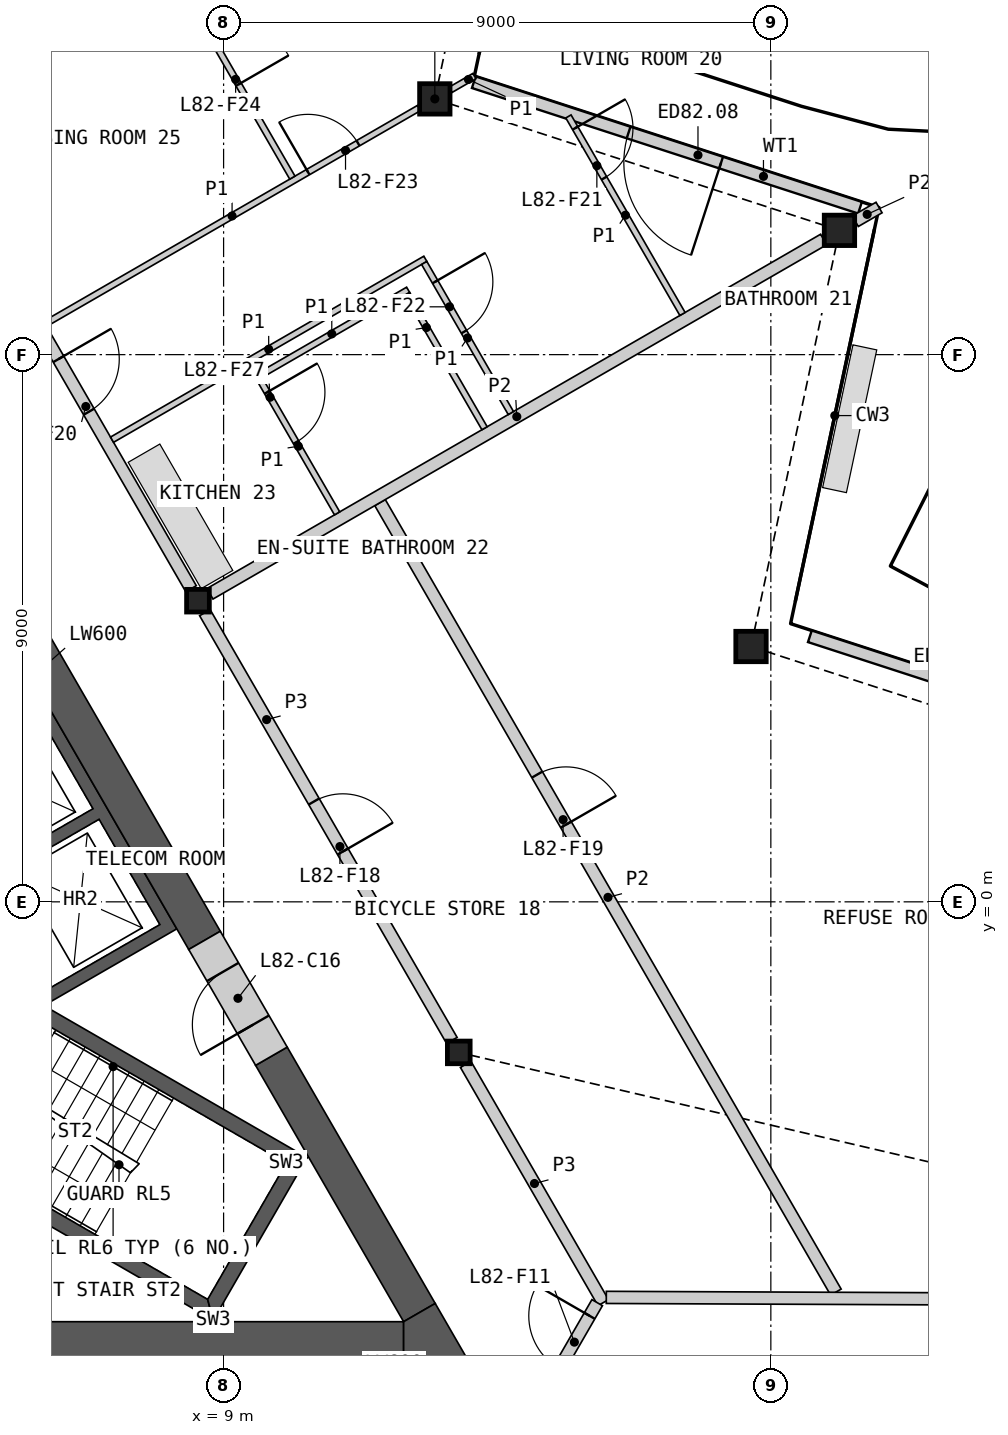
"""IFC4 building model, lengths in metres.
Left out: names, types, materials, properties, quantities, classifications, styles, units other than length and angle.
Written with IfcOpenShell. Run it as: python <this file> out.ifc"""

import sys

from ifc_helpers import new_model, si_unit, direction, frame, frame_2d, origin, origin_2d, place, context, subcontext, project, spatial, polyline, rectangle, hollow_rectangle, i_section, outline, extrude, element, fill, save


model = new_model("IFC4")
c1 = context("Model", 3, precision=1e-05, world=origin(), true_north=direction((0.0, 1.0)))
c2 = subcontext(c1, "Body", "Model", "MODEL_VIEW")
j1 = project(units=[si_unit("LENGTHUNIT", "METRE"), si_unit("PLANEANGLEUNIT", "RADIAN")], contexts=[c1])
p1 = place(None, origin())
s1 = spatial("IfcSite", under=j1, at=p1, CompositionType="ELEMENT")
p2 = place(p1, origin())
s2 = spatial("IfcBuilding", under=s1, at=p2, CompositionType="ELEMENT")
p3 = place(p2, frame((0.0, 0.0, 367.8)))
s3 = spatial("IfcBuildingStorey", under=s2, at=p3, CompositionType="ELEMENT", Elevation=367.8)
for number, where, z_axis, x_axis in (
    (1, (17.674, 4.199, 0.0), (0.0, 0.0, 1.0), (1.0, 0.0, 0.0)),
    (2, (19.129, 11.044, 0.0), (0.0, 0.0, 1.0), (1.0, 0.0, 0.0)),
    (3, (12.474, 13.206, 0.0), (0.0, 0.0, 1.0), (1.0, 0.0, 0.0)),
):
    element("IfcColumn", number, at=place(p3, frame(where, z_axis=z_axis, x_axis=x_axis)), inside=s3, PredefinedType="COLUMN", context=c2, shape_type="SweptSolid", body=[
        extrude(hollow_rectangle(XDim=0.5, YDim=0.5, WallThickness=0.03, at=origin_2d()), origin(), (0.0, 0.0, 1.0), 3.4),
    ])
for number, where, z_axis, x_axis in (
    (4, (12.868, -2.476, 0.0), (0.0, 0.0, 1.0), (1.0, 0.0, 0.0)),
    (5, (8.578, 4.953, 0.0), (0.0, 0.0, 1.0), (1.0, 0.0, 0.0)),
):
    element("IfcColumn", number, at=place(p3, frame(where, z_axis=z_axis, x_axis=x_axis)), inside=s3, PredefinedType="COLUMN", context=c2, shape_type="SweptSolid", body=[
        extrude(i_section(OverallWidth=0.374, OverallDepth=0.372, WebThickness=0.016, FlangeThickness=0.026, at=origin_2d()), origin(), (0.0, 0.0, 1.0), 3.4),
    ])
p4 = place(p3, frame((24.601, 2.431, 0.0), z_axis=(0.0, 0.0, 1.0), x_axis=(-0.951060123915, 0.309005891041, 0.0)))
e6 = element("IfcWall", 6, at=p4, inside=s3, PredefinedType="SOLIDWALL", context=c2, shape_type="SweptSolid", body=[
    extrude(rectangle(XDim=6.265, YDim=0.2, at=frame_2d((3.133, 0.0))), origin(), (0.0, 0.0, 1.0), 2.634),
])
p5 = place(p4, frame((2.333, 0.0, 0.0)))
e7 = element("IfcOpeningElement", 7, at=p5, cuts=e6, PredefinedType="OPENING", context=c2, shape_type="SweptSolid", body=[
    extrude(rectangle(XDim=1.6, YDim=2.25, at=frame_2d((0.8, 1.125))), frame((0.0, 0.11, 0.0), z_axis=(0.0, -1.0, 0.0), x_axis=(1.0, 0.0, 0.0)), (0.0, 0.0, 1.0), 0.22),
])
p6 = place(p3, frame((19.467, 11.416, 0.0), z_axis=(0.0, 0.0, 1.0), x_axis=(-0.951057706878, 0.309013330114, 0.0)))
e8 = element("IfcWall", 8, at=p6, inside=s3, PredefinedType="SOLIDWALL", context=c2, shape_type="SweptSolid", body=[
    extrude(rectangle(XDim=6.678, YDim=0.2, at=frame_2d((3.339, 0.0))), origin(), (0.0, 0.0, 1.0), 2.634),
])
p7 = place(p6, frame((2.402, 0.0, 0.0)))
e9 = element("IfcOpeningElement", 9, at=p7, cuts=e8, PredefinedType="OPENING", context=c2, shape_type="SweptSolid", body=[
    extrude(rectangle(XDim=1.6, YDim=2.25, at=frame_2d((0.8, 1.125))), frame((0.0, 0.11, 0.0), z_axis=(0.0, -1.0, 0.0), x_axis=(1.0, 0.0, 0.0)), (0.0, 0.0, 1.0), 0.22),
])
p8 = place(p3, origin())
e10 = element("IfcWall", 10, at=p8, inside=s3, PredefinedType="SHEAR", context=c2, shape_type="SweptSolid", body=[
    extrude(outline(polyline([(1.561, 6.097), (3.731, 7.35), (8.231, -0.444), (6.061, -1.697), (5.96, -1.524), (7.952, -0.374), (6.952, 1.358), (4.96, 0.208), (4.861, 0.381), (6.852, 1.531), (5.852, 3.263), (3.861, 2.113), (3.76, 2.287), (5.752, 3.437), (4.752, 5.169), (2.76, 4.019), (2.66, 4.192), (4.652, 5.342), (3.652, 7.074), (1.66, 5.924), (1.561, 6.097)])), origin(), (0.0, 0.0, 1.0), 3.1),
])
p9 = place(p3, origin())
e11 = element("IfcWall", 11, at=p9, inside=s3, PredefinedType="SHEAR", context=c2, shape_type="SweptSolid", body=[
    extrude(outline(polyline([(3.763, -3.956), (8.83, -6.881), (8.738, -6.539), (3.888, -3.739), (3.763, -3.956)])), origin(), (0.0, 0.0, 1.0), 3.1),
])
p10 = place(p3, origin())
e12 = element("IfcWall", 12, at=p10, inside=s3, PredefinedType="SHEAR", context=c2, shape_type="SweptSolid", body=[
    extrude(outline(polyline([(8.83, -6.881), (10.374, -4.206), (10.032, -4.298), (8.738, -6.539), (8.83, -6.881)])), origin(), (0.0, 0.0, 1.0), 3.1),
])
p11 = place(p3, origin())
e13 = element("IfcWall", 13, at=p11, inside=s3, PredefinedType="SHEAR", context=c2, shape_type="SweptSolid", body=[
    extrude(outline(polyline([(10.032, -4.298), (10.374, -4.206), (5.307, -1.281), (5.182, -1.498), (10.032, -4.298)])), origin(), (0.0, 0.0, 1.0), 3.1),
])
p12 = place(p3, frame((-11.961, -7.206, 0.0), z_axis=(0.0, 0.0, 1.0), x_axis=(1.0, 0.0, 0.0)))
e14 = element("IfcWall", 14, at=p12, inside=s3, PredefinedType="SHEAR", context=c2, shape_type="SweptSolid", body=[
    extrude(rectangle(XDim=23.921, YDim=0.6, at=frame_2d((11.961, 0.0))), origin(), (0.0, 0.0, 1.0), 3.1),
])
p13 = place(p3, frame((8.686, -0.634, 0.0), z_axis=(0.0, 0.0, 1.0), x_axis=(-0.50001836461, 0.866014800712, 0.0)))
e15 = element("IfcWall", 15, at=p13, inside=s3, PredefinedType="SHEAR", context=c2, shape_type="SweptSolid", body=[
    extrude(rectangle(XDim=10.451, YDim=0.6, at=frame_2d((5.225, 0.0))), origin(), (0.0, 0.0, 1.0), 3.1),
])
p14 = place(p3, frame((12.221, -6.756, 0.0), z_axis=(0.0, 0.0, 1.0), x_axis=(-0.50000604952, 0.866021911064, 0.0)))
e16 = element("IfcWall", 16, at=p14, inside=s3, PredefinedType="SHEAR", context=c2, shape_type="SweptSolid", body=[
    extrude(rectangle(XDim=4.869, YDim=0.6, at=frame_2d((2.434, 0.0))), origin(), (0.0, 0.0, 1.0), 3.1),
])
p15 = place(p3, origin())
e17 = element("IfcWall", 17, at=p15, inside=s3, PredefinedType="SHEAR", context=c2, shape_type="SweptSolid", body=[
    extrude(outline(polyline([(11.961, -7.506), (11.961, -6.906), (12.48, -6.606), (13.0, -7.506), (11.961, -7.506)])), origin(), (0.0, 0.0, 1.0), 3.1),
])
p16 = place(p3, frame((9.786, -2.539, 0.0), z_axis=(0.0, 0.0, 1.0), x_axis=(-0.499981787252, 0.866035918664, 0.0)))
e18 = element("IfcWall", 18, at=p16, inside=s3, PredefinedType="SHEAR", context=c2, shape_type="SweptSolid", body=[
    extrude(rectangle(XDim=2.2, YDim=0.6, at=frame_2d((1.1, 0.0))), origin(), (0.0, 0.0, 1.0), 3.1),
])
p17 = place(p16, frame((0.6, 0.0, 0.0)))
e19 = element("IfcOpeningElement", 19, at=p17, cuts=e18, PredefinedType="OPENING", context=c2, shape_type="SweptSolid", body=[
    extrude(rectangle(XDim=1.0, YDim=2.1, at=frame_2d((0.5, 1.05))), frame((0.0, 0.31, 0.0), z_axis=(0.0, -1.0, 0.0), x_axis=(1.0, 0.0, 0.0)), (0.0, 0.0, 1.0), 0.62),
])
p18 = place(p3, frame((4.403, 12.185, 0.0), z_axis=(0.0, 0.0, 1.0), x_axis=(0.499992155518, -0.866029932751, 0.0)))
e20 = element("IfcWall", 20, at=p18, inside=s3, PredefinedType="PARTITIONING", context=c2, shape_type="SweptSolid", body=[
    extrude(rectangle(XDim=8.123, YDim=0.2, at=frame_2d((4.062, 0.0))), origin(), (0.0, 0.0, 1.0), 3.1),
])
p19 = place(p18, frame((3.762, 0.0, 0.0)))
e21 = element("IfcOpeningElement", 21, at=p19, cuts=e20, PredefinedType="OPENING", context=c2, shape_type="SweptSolid", body=[
    extrude(rectangle(XDim=1.0, YDim=2.1, at=frame_2d((0.5, 1.05))), frame((0.0, 0.11, 0.0), z_axis=(0.0, -1.0, 0.0), x_axis=(1.0, 0.0, 0.0)), (0.0, 0.0, 1.0), 0.22),
])
p20 = place(p3, frame((8.692, 4.756, 0.0), z_axis=(0.0, 0.0, 1.0), x_axis=(0.500001682468, -0.866024432409, 0.0)))
e22 = element("IfcWall", 22, at=p20, inside=s3, PredefinedType="PARTITIONING", context=c2, shape_type="SweptSolid", body=[
    extrude(rectangle(XDim=8.124, YDim=0.2, at=frame_2d((4.062, 0.0))), origin(), (0.0, 0.0, 1.0), 3.1),
])
p21 = place(p20, frame((3.587, 0.0, 0.0)))
e23 = element("IfcOpeningElement", 23, at=p21, cuts=e22, PredefinedType="OPENING", context=c2, shape_type="SweptSolid", body=[
    extrude(rectangle(XDim=0.95, YDim=2.1, at=frame_2d((0.475, 1.05))), frame((0.0, 0.11, 0.0), z_axis=(0.0, -1.0, 0.0), x_axis=(1.0, 0.0, 0.0)), (0.0, 0.0, 1.0), 0.22),
])
p22 = place(p3, frame((12.981, -2.673, 0.0), z_axis=(0.0, 0.0, 1.0), x_axis=(0.499974648164, -0.866040040179, 0.0)))
e24 = element("IfcWall", 24, at=p22, inside=s3, PredefinedType="PARTITIONING", context=c2, shape_type="SweptSolid", body=[
    extrude(rectangle(XDim=4.525, YDim=0.2, at=frame_2d((2.263, 0.0))), origin(), (0.0, 0.0, 1.0), 3.1),
])
p23 = place(p3, frame((13.293, -9.797, 0.0), z_axis=(0.0, 0.0, 1.0), x_axis=(0.499977520935, 0.86603838169, 0.0)))
e25 = element("IfcWall", 25, at=p23, inside=s3, PredefinedType="PARTITIONING", context=c2, shape_type="SweptSolid", body=[
    extrude(rectangle(XDim=3.701, YDim=0.2, at=frame_2d((1.851, 0.0))), origin(), (0.0, 0.0, 1.0), 3.1),
])
p24 = place(p23, frame((2.451, 0.0, 0.0)))
e26 = element("IfcOpeningElement", 26, at=p24, cuts=e25, PredefinedType="OPENING", context=c2, shape_type="SweptSolid", body=[
    extrude(rectangle(XDim=1.0, YDim=2.1, at=frame_2d((0.5, 1.05))), frame((0.0, 0.11, 0.0), z_axis=(0.0, -1.0, 0.0), x_axis=(1.0, 0.0, 0.0)), (0.0, 0.0, 1.0), 0.22),
])
p25 = place(p3, frame((11.573, 6.566, 0.0), z_axis=(0.0, 0.0, 1.0), x_axis=(0.499993542657, -0.866029131901, 0.0)))
e27 = element("IfcWall", 27, at=p25, inside=s3, PredefinedType="PARTITIONING", context=c2, shape_type="SweptSolid", body=[
    extrude(rectangle(XDim=14.994, YDim=0.2, at=frame_2d((7.497, 0.0))), origin(), (0.0, 0.0, 1.0), 2.33),
])
p26 = place(p25, frame((5.166, 0.0, 0.0)))
e28 = element("IfcOpeningElement", 28, at=p26, cuts=e27, PredefinedType="OPENING", context=c2, shape_type="SweptSolid", body=[
    extrude(rectangle(XDim=0.95, YDim=2.1, at=frame_2d((0.475, 1.05))), frame((0.0, 0.11, 0.0), z_axis=(0.0, -1.0, 0.0), x_axis=(1.0, 0.0, 0.0)), (0.0, 0.0, 1.0), 0.22),
])
p27 = place(p3, frame((15.294, -6.506, 0.0), z_axis=(0.0, 0.0, 1.0), x_axis=(0.99999116141, -0.004204414611, 0.0)))
e29 = element("IfcWall", 29, at=p27, inside=s3, PredefinedType="PARTITIONING", context=c2, shape_type="SweptSolid", body=[
    extrude(rectangle(XDim=14.807, YDim=0.2, at=frame_2d((7.404, 0.0))), origin(), (0.0, 0.0, 1.0), 2.33),
])
p28 = place(p3, frame((8.775, 5.066, 0.0), z_axis=(0.0, 0.0, 1.0), x_axis=(0.866023724155, 0.500002909193, 0.0)))
e30 = element("IfcWall", 30, at=p28, inside=s3, PredefinedType="PARTITIONING", context=c2, shape_type="SweptSolid", body=[
    extrude(rectangle(XDim=11.655, YDim=0.2, at=frame_2d((5.827, 0.0))), origin(), (0.0, 0.0, 1.0), 2.33),
])
p29 = place(p3, frame((19.389, 11.194, 0.0), z_axis=(0.0, 0.0, 1.0), x_axis=(0.866104518135, 0.499862944882, 0.0)))
e31 = element("IfcWall", 31, at=p29, inside=s3, PredefinedType="PARTITIONING", context=c2, shape_type="SweptSolid", body=[
    extrude(rectangle(XDim=0.451, YDim=0.2, at=frame_2d((0.226, 0.0))), origin(), (0.0, 0.0, 1.0), 2.33),
])
p30 = place(p3, frame((3.465, 14.01, 0.0), z_axis=(0.0, 0.0, 1.0), x_axis=(0.866032376801, 0.499987922186, 0.0)))
e32 = element("IfcWall", 32, at=p30, inside=s3, PredefinedType="PARTITIONING", context=c2, shape_type="SweptSolid", body=[
    extrude(rectangle(XDim=11.782, YDim=0.1, at=frame_2d((5.891, 0.0))), origin(), (0.0, 0.0, 1.0), 2.33),
])
p31 = place(p30, frame((6.67, 0.0, 0.0)))
e33 = element("IfcOpeningElement", 33, at=p31, cuts=e32, PredefinedType="OPENING", context=c2, shape_type="SweptSolid", body=[
    extrude(rectangle(XDim=0.95, YDim=2.1, at=frame_2d((0.475, 1.05))), frame((0.0, 0.06, 0.0), z_axis=(0.0, -1.0, 0.0), x_axis=(1.0, 0.0, 0.0)), (0.0, 0.0, 1.0), 0.12),
])
p32 = place(p3, frame((6.065, 9.506, 0.0), z_axis=(0.0, 0.0, 1.0), x_axis=(0.866018949465, 0.500011179042, 0.0)))
e34 = element("IfcWall", 34, at=p32, inside=s3, PredefinedType="PARTITIONING", context=c2, shape_type="SweptSolid", body=[
    extrude(rectangle(XDim=7.1, YDim=0.1, at=frame_2d((3.55, 0.0))), origin(), (0.0, 0.0, 1.0), 2.33),
])
p33 = place(p32, frame((4.992, 0.0, 0.0)))
e35 = element("IfcOpeningElement", 35, at=p33, cuts=e34, PredefinedType="OPENING", context=c2, shape_type="SweptSolid", body=[
    extrude(rectangle(XDim=0.95, YDim=2.1, at=frame_2d((0.475, 1.05))), frame((0.0, 0.06, 0.0), z_axis=(0.0, -1.0, 0.0), x_axis=(1.0, 0.0, 0.0)), (0.0, 0.0, 1.0), 0.12),
])
p34 = place(p3, frame((7.165, 7.601, 0.0), z_axis=(0.0, 0.0, 1.0), x_axis=(0.866017493347, 0.500013701029, 0.0)))
e36 = element("IfcWall", 36, at=p34, inside=s3, PredefinedType="PARTITIONING", context=c2, shape_type="SweptSolid", body=[
    extrude(rectangle(XDim=5.95, YDim=0.1, at=frame_2d((2.975, 0.0))), origin(), (0.0, 0.0, 1.0), 2.33),
])
p35 = place(p3, frame((7.581, 16.328, 0.0), z_axis=(0.0, 0.0, 1.0), x_axis=(0.500005610874, -0.86602216432, 0.0)))
e37 = element("IfcWall", 37, at=p35, inside=s3, PredefinedType="PARTITIONING", context=c2, shape_type="SweptSolid", body=[
    extrude(rectangle(XDim=5.1, YDim=0.1, at=frame_2d((2.55, 0.0))), origin(), (0.0, 0.0, 1.0), 2.33),
])
p36 = place(p35, frame((2.379, 0.0, 0.0)))
e38 = element("IfcOpeningElement", 38, at=p36, cuts=e37, PredefinedType="OPENING", context=c2, shape_type="SweptSolid", body=[
    extrude(rectangle(XDim=0.95, YDim=2.1, at=frame_2d((0.475, 1.05))), frame((0.0, 0.06, 0.0), z_axis=(0.0, -1.0, 0.0), x_axis=(1.0, 0.0, 0.0)), (0.0, 0.0, 1.0), 0.12),
])
p37 = place(p3, frame((14.671, 12.918, 0.0), z_axis=(0.0, 0.0, 1.0), x_axis=(0.499981580887, -0.866036037803, 0.0)))
e39 = element("IfcWall", 39, at=p37, inside=s3, PredefinedType="PARTITIONING", context=c2, shape_type="SweptSolid", body=[
    extrude(rectangle(XDim=3.752, YDim=0.1, at=frame_2d((1.876, 0.0))), origin(), (0.0, 0.0, 1.0), 2.33),
])
p38 = place(p37, frame((0.222, 0.0, 0.0)))
e40 = element("IfcOpeningElement", 40, at=p38, cuts=e39, PredefinedType="OPENING", context=c2, shape_type="SweptSolid", body=[
    extrude(rectangle(XDim=0.95, YDim=2.1, at=frame_2d((0.475, 1.05))), frame((0.0, 0.06, 0.0), z_axis=(0.0, -1.0, 0.0), x_axis=(1.0, 0.0, 0.0)), (0.0, 0.0, 1.0), 0.12),
])
p39 = place(p3, frame((12.3, 10.508, 0.0), z_axis=(0.0, 0.0, 1.0), x_axis=(0.499999279071, -0.866025820012, 0.0)))
e41 = element("IfcWall", 41, at=p39, inside=s3, PredefinedType="PARTITIONING", context=c2, shape_type="SweptSolid", body=[
    extrude(rectangle(XDim=2.85, YDim=0.1, at=frame_2d((1.425, 0.0))), origin(), (0.0, 0.0, 1.0), 2.33),
])
p40 = place(p39, frame((0.358, 0.0, 0.0)))
e42 = element("IfcOpeningElement", 42, at=p40, cuts=e41, PredefinedType="OPENING", context=c2, shape_type="SweptSolid", body=[
    extrude(rectangle(XDim=0.95, YDim=2.1, at=frame_2d((0.475, 1.05))), frame((0.0, 0.06, 0.0), z_axis=(0.0, -1.0, 0.0), x_axis=(1.0, 0.0, 0.0)), (0.0, 0.0, 1.0), 0.12),
])
p41 = place(p3, frame((9.523, 8.616, 0.0), z_axis=(0.0, 0.0, 1.0), x_axis=(0.866032775405, 0.499987231761, 0.0)))
e43 = element("IfcWall", 43, at=p41, inside=s3, PredefinedType="PARTITIONING", context=c2, shape_type="SweptSolid", body=[
    extrude(rectangle(XDim=2.9, YDim=0.1, at=frame_2d((1.45, 0.0))), origin(), (0.0, 0.0, 1.0), 2.33),
])
p42 = place(p3, frame((12.017, 9.998, 0.0), z_axis=(0.0, 0.0, 1.0), x_axis=(0.499948979701, -0.866054858364, 0.0)))
e44 = element("IfcWall", 44, at=p42, inside=s3, PredefinedType="PARTITIONING", context=c2, shape_type="SweptSolid", body=[
    extrude(rectangle(XDim=2.55, YDim=0.1, at=frame_2d((1.275, 0.0))), origin(), (0.0, 0.0, 1.0), 2.33),
])
p43 = place(p3, frame((9.592, 8.598, 0.0), z_axis=(0.0, 0.0, 1.0), x_axis=(0.499990435942, -0.866030925526, 0.0)))
e45 = element("IfcWall", 45, at=p43, inside=s3, PredefinedType="PARTITIONING", context=c2, shape_type="SweptSolid", body=[
    extrude(rectangle(XDim=2.55, YDim=0.1, at=frame_2d((1.275, 0.0))), origin(), (0.0, 0.0, 1.0), 2.33),
])
p44 = place(p43, frame((0.25, 0.0, 0.0)))
e46 = element("IfcOpeningElement", 46, at=p44, cuts=e45, PredefinedType="OPENING", context=c2, shape_type="SweptSolid", body=[
    extrude(rectangle(XDim=0.95, YDim=2.1, at=frame_2d((0.475, 1.05))), frame((0.0, 0.06, 0.0), z_axis=(0.0, -1.0, 0.0), x_axis=(1.0, 0.0, 0.0)), (0.0, 0.0, 1.0), 0.12),
])
p45 = place(p3, frame((12.734, 13.356, 0.0), z_axis=(0.0, 0.0, 1.0), x_axis=(0.865870279271, 0.500268587336, 0.0)))
e47 = element("IfcWall", 47, at=p45, inside=s3, PredefinedType="PARTITIONING", context=c2, shape_type="SweptSolid", body=[
    extrude(rectangle(XDim=0.451, YDim=0.1, at=frame_2d((0.226, 0.0))), origin(), (0.0, 0.0, 1.0), 2.33),
])
p46 = place(p7, origin())
e48 = element("IfcDoor", 48, at=p46, inside=s3, OperationType="DOUBLE_DOOR_SINGLE_SWING", PredefinedType="DOOR", context=c2, shape_type="SweptSolid", body=[
    extrude(rectangle(XDim=1.6, YDim=2.25, at=frame_2d((0.8, 1.125))), frame((0.0, 0.025, 0.0), z_axis=(0.0, -1.0, 0.0), x_axis=(1.0, 0.0, 0.0)), (0.0, 0.0, 1.0), 0.05),
])
fill(e9, e48)
p47 = place(p17, origin())
e49 = element("IfcDoor", 49, at=p47, inside=s3, OperationType="SINGLE_SWING_LEFT", PredefinedType="DOOR", context=c2, shape_type="SweptSolid", body=[
    extrude(rectangle(XDim=1.0, YDim=2.1, at=frame_2d((0.5, 1.05))), frame((0.0, 0.055, 0.0), z_axis=(0.0, -1.0, 0.0), x_axis=(1.0, 0.0, 0.0)), (0.0, 0.0, 1.0), 0.05),
])
fill(e19, e49)
p48 = place(p24, origin())
e50 = element("IfcDoor", 50, at=p48, inside=s3, OperationType="SINGLE_SWING_RIGHT", PredefinedType="DOOR", context=c2, shape_type="SweptSolid", body=[
    extrude(rectangle(XDim=1.0, YDim=2.1, at=frame_2d((0.5, 1.05))), frame((0.0, 0.025, 0.0), z_axis=(0.0, -1.0, 0.0), x_axis=(1.0, 0.0, 0.0)), (0.0, 0.0, 1.0), 0.05),
])
fill(e26, e50)
p49 = place(p21, origin())
e51 = element("IfcDoor", 51, at=p49, inside=s3, OperationType="SINGLE_SWING_RIGHT", PredefinedType="DOOR", context=c2, shape_type="SweptSolid", body=[
    extrude(rectangle(XDim=0.95, YDim=2.1, at=frame_2d((0.475, 1.05))), frame((0.0, 0.025, 0.0), z_axis=(0.0, -1.0, 0.0), x_axis=(1.0, 0.0, 0.0)), (0.0, 0.0, 1.0), 0.05),
])
fill(e23, e51)
p50 = place(p26, origin())
e52 = element("IfcDoor", 52, at=p50, inside=s3, OperationType="SINGLE_SWING_RIGHT", PredefinedType="DOOR", context=c2, shape_type="SweptSolid", body=[
    extrude(rectangle(XDim=0.95, YDim=2.1, at=frame_2d((0.475, 1.05))), frame((0.0, 0.025, 0.0), z_axis=(0.0, -1.0, 0.0), x_axis=(1.0, 0.0, 0.0)), (0.0, 0.0, 1.0), 0.05),
])
fill(e28, e52)
p51 = place(p19, origin())
e53 = element("IfcDoor", 53, at=p51, inside=s3, OperationType="SINGLE_SWING_LEFT", PredefinedType="DOOR", context=c2, shape_type="SweptSolid", body=[
    extrude(rectangle(XDim=1.0, YDim=2.1, at=frame_2d((0.5, 1.05))), frame((0.0, 0.025, 0.0), z_axis=(0.0, -1.0, 0.0), x_axis=(1.0, 0.0, 0.0)), (0.0, 0.0, 1.0), 0.05),
])
fill(e21, e53)
p52 = place(p38, origin())
e54 = element("IfcDoor", 54, at=p52, inside=s3, OperationType="SINGLE_SWING_LEFT", PredefinedType="DOOR", context=c2, shape_type="SweptSolid", body=[
    extrude(rectangle(XDim=0.95, YDim=2.1, at=frame_2d((0.475, 1.05))), frame((0.0, 0.025, 0.0), z_axis=(0.0, -1.0, 0.0), x_axis=(1.0, 0.0, 0.0)), (0.0, 0.0, 1.0), 0.05),
])
fill(e40, e54)
p53 = place(p40, origin())
e55 = element("IfcDoor", 55, at=p53, inside=s3, OperationType="SINGLE_SWING_LEFT", PredefinedType="DOOR", context=c2, shape_type="SweptSolid", body=[
    extrude(rectangle(XDim=0.95, YDim=2.1, at=frame_2d((0.475, 1.05))), frame((0.0, 0.025, 0.0), z_axis=(0.0, -1.0, 0.0), x_axis=(1.0, 0.0, 0.0)), (0.0, 0.0, 1.0), 0.05),
])
fill(e42, e55)
p54 = place(p33, origin())
e56 = element("IfcDoor", 56, at=p54, inside=s3, OperationType="SINGLE_SWING_LEFT", PredefinedType="DOOR", context=c2, shape_type="SweptSolid", body=[
    extrude(rectangle(XDim=0.95, YDim=2.1, at=frame_2d((0.475, 1.05))), frame((0.0, 0.025, 0.0), z_axis=(0.0, -1.0, 0.0), x_axis=(1.0, 0.0, 0.0)), (0.0, 0.0, 1.0), 0.05),
])
fill(e35, e56)
p55 = place(p36, origin())
e57 = element("IfcDoor", 57, at=p55, inside=s3, OperationType="SINGLE_SWING_RIGHT", PredefinedType="DOOR", context=c2, shape_type="SweptSolid", body=[
    extrude(rectangle(XDim=0.95, YDim=2.1, at=frame_2d((0.475, 1.05))), frame((0.0, 0.025, 0.0), z_axis=(0.0, -1.0, 0.0), x_axis=(1.0, 0.0, 0.0)), (0.0, 0.0, 1.0), 0.05),
])
fill(e38, e57)
p56 = place(p44, origin())
e58 = element("IfcDoor", 58, at=p56, inside=s3, OperationType="SINGLE_SWING_LEFT", PredefinedType="DOOR", context=c2, shape_type="SweptSolid", body=[
    extrude(rectangle(XDim=0.95, YDim=2.1, at=frame_2d((0.475, 1.05))), frame((0.0, 0.025, 0.0), z_axis=(0.0, -1.0, 0.0), x_axis=(1.0, 0.0, 0.0)), (0.0, 0.0, 1.0), 0.05),
])
fill(e46, e58)
save(model, sys.argv[1])
